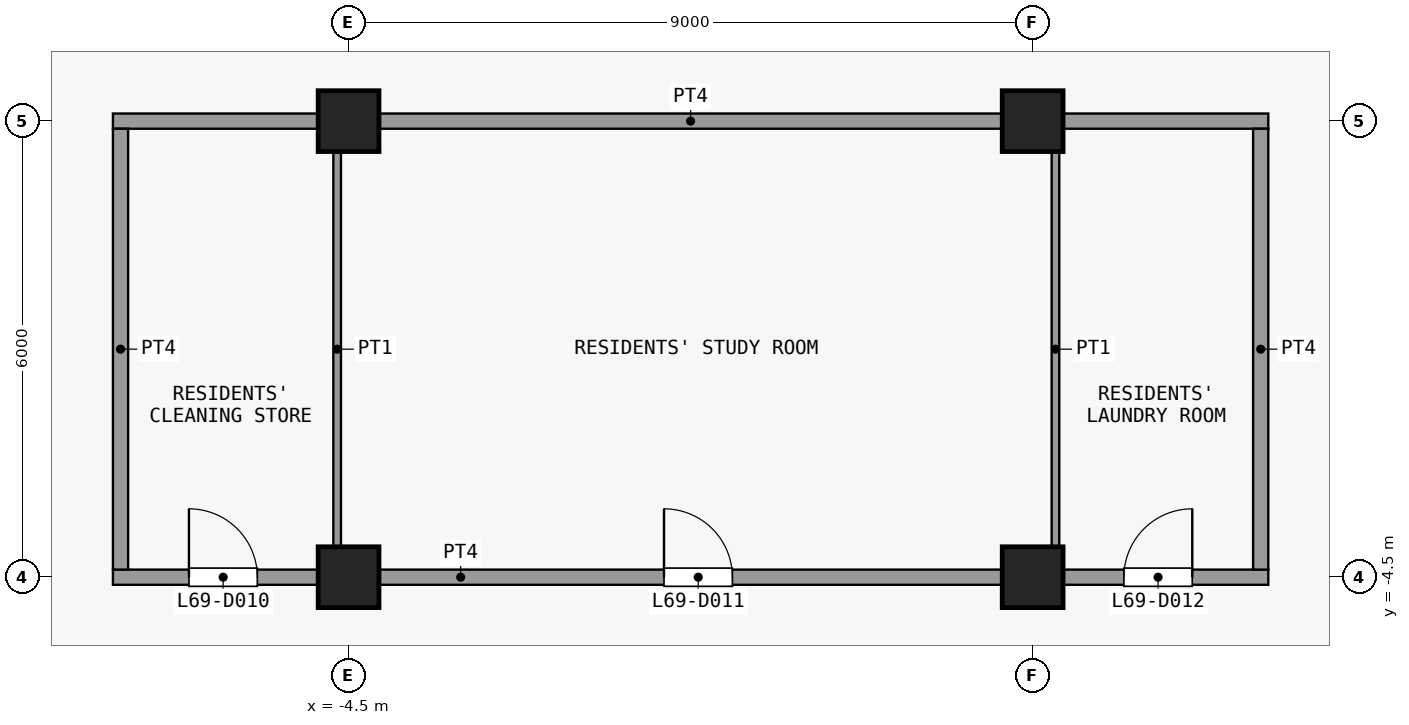
"""IFC4 building model, lengths in metres.
Left out: names, types, materials, properties, quantities, classifications, styles, units other than length and angle.
Written with IfcOpenShell. Run it as: python <this file> out.ifc"""

import sys

from ifc_helpers import new_model, si_unit, direction, frame, frame_2d, origin, origin_2d, place, context, subcontext, project, spatial, rectangle, extrude, element, fill, save


model = new_model("IFC4")
c1 = context("Model", 3, precision=1e-05, world=origin(), true_north=direction((0.0, 1.0)))
c2 = subcontext(c1, "Body", "Model", "MODEL_VIEW")
j1 = project(units=[si_unit("LENGTHUNIT", "METRE"), si_unit("PLANEANGLEUNIT", "RADIAN")], contexts=[c1])
p1 = place(None, origin())
s1 = spatial("IfcSite", under=j1, at=p1, CompositionType="ELEMENT")
p2 = place(p1, origin())
s2 = spatial("IfcBuilding", under=s1, at=p2, CompositionType="ELEMENT")
p3 = place(p2, frame((0.0, 0.0, 273.5)))
s3 = spatial("IfcBuildingStorey", under=s2, at=p3, CompositionType="ELEMENT", Elevation=273.5)
for number, where, z_axis, x_axis in (
    (1, (-4.5, -4.5, 0.0), (0.0, 0.0, 1.0), (1.0, 0.0, 0.0)),
    (2, (-4.5, 1.5, 0.0), (0.0, 0.0, 1.0), (1.0, 0.0, 0.0)),
    (3, (4.5, -4.5, 0.0), (0.0, 0.0, 1.0), (1.0, 0.0, 0.0)),
    (4, (4.5, 1.5, 0.0), (0.0, 0.0, 1.0), (1.0, 0.0, 0.0)),
):
    element("IfcColumn", number, at=place(p3, frame(where, z_axis=z_axis, x_axis=x_axis)), inside=s3, PredefinedType="COLUMN", context=c2, shape_type="SweptSolid", body=[
        extrude(rectangle(XDim=0.8, YDim=0.8, at=origin_2d()), origin(), (0.0, 0.0, 1.0), 3.6),
    ])
p4 = place(p3, frame((-7.6, -4.5, 0.0), z_axis=(0.0, 0.0, 1.0), x_axis=(1.0, 0.0, 0.0)))
e5 = element("IfcWall", 5, at=p4, inside=s3, PredefinedType="PARTITIONING", context=c2, shape_type="SweptSolid", body=[
    extrude(rectangle(XDim=15.2, YDim=0.2, at=frame_2d((7.6, 0.0))), origin(), (0.0, 0.0, 1.0), 3.3),
])
p5 = place(p4, frame((1.0, 0.0, 0.0)))
e6 = element("IfcOpeningElement", 6, at=p5, cuts=e5, PredefinedType="OPENING", context=c2, shape_type="SweptSolid", body=[
    extrude(rectangle(XDim=0.9, YDim=2.1, at=frame_2d((0.45, 1.05))), frame((0.0, 0.11, 0.0), z_axis=(0.0, -1.0, 0.0), x_axis=(1.0, 0.0, 0.0)), (0.0, 0.0, 1.0), 0.22),
])
p6 = place(p4, frame((7.25, 0.0, 0.0)))
e7 = element("IfcOpeningElement", 7, at=p6, cuts=e5, PredefinedType="OPENING", context=c2, shape_type="SweptSolid", body=[
    extrude(rectangle(XDim=0.9, YDim=2.1, at=frame_2d((0.45, 1.05))), frame((0.0, 0.11, 0.0), z_axis=(0.0, -1.0, 0.0), x_axis=(1.0, 0.0, 0.0)), (0.0, 0.0, 1.0), 0.22),
])
p7 = place(p4, frame((13.3, 0.0, 0.0)))
e8 = element("IfcOpeningElement", 8, at=p7, cuts=e5, PredefinedType="OPENING", context=c2, shape_type="SweptSolid", body=[
    extrude(rectangle(XDim=0.9, YDim=2.1, at=frame_2d((0.45, 1.05))), frame((0.0, 0.11, 0.0), z_axis=(0.0, -1.0, 0.0), x_axis=(1.0, 0.0, 0.0)), (0.0, 0.0, 1.0), 0.22),
])
p8 = place(p3, frame((-7.6, 1.5, 0.0), z_axis=(0.0, 0.0, 1.0), x_axis=(1.0, 0.0, 0.0)))
e9 = element("IfcWall", 9, at=p8, inside=s3, PredefinedType="PARTITIONING", context=c2, shape_type="SweptSolid", body=[
    extrude(rectangle(XDim=15.2, YDim=0.2, at=frame_2d((7.6, 0.0))), origin(), (0.0, 0.0, 1.0), 3.3),
])
p9 = place(p3, frame((-7.5, -4.4, 0.0), z_axis=(0.0, 0.0, 1.0), x_axis=(0.0, 1.0, 0.0)))
e10 = element("IfcWall", 10, at=p9, inside=s3, PredefinedType="PARTITIONING", context=c2, shape_type="SweptSolid", body=[
    extrude(rectangle(XDim=5.8, YDim=0.2, at=frame_2d((2.9, 0.0))), origin(), (0.0, 0.0, 1.0), 3.3),
])
for number, where, z_axis, x_axis in (
    (11, (-4.65, -4.4, 0.0), (0.0, 0.0, 1.0), (0.0, 1.0, 0.0)),
    (12, (4.8, -4.4, 0.0), (0.0, 0.0, 1.0), (0.0, 1.0, 0.0)),
):
    element("IfcWall", number, at=place(p3, frame(where, z_axis=z_axis, x_axis=x_axis)), inside=s3, PredefinedType="PARTITIONING", context=c2, shape_type="SweptSolid", body=[
        extrude(rectangle(XDim=5.8, YDim=0.1, at=frame_2d((2.9, 0.0))), origin(), (0.0, 0.0, 1.0), 3.3),
    ])
p10 = place(p3, frame((7.5, -4.4, 0.0), z_axis=(0.0, 0.0, 1.0), x_axis=(0.0, 1.0, 0.0)))
e13 = element("IfcWall", 13, at=p10, inside=s3, PredefinedType="PARTITIONING", context=c2, shape_type="SweptSolid", body=[
    extrude(rectangle(XDim=5.8, YDim=0.2, at=frame_2d((2.9, 0.0))), origin(), (0.0, 0.0, 1.0), 3.3),
])
p11 = place(p5, origin())
e14 = element("IfcDoor", 14, at=p11, inside=s3, OperationType="SINGLE_SWING_RIGHT", PredefinedType="DOOR", context=c2, shape_type="SweptSolid", body=[
    extrude(rectangle(XDim=0.9, YDim=2.1, at=frame_2d((0.45, 1.05))), frame((0.0, 0.025, 0.0), z_axis=(0.0, -1.0, 0.0), x_axis=(1.0, 0.0, 0.0)), (0.0, 0.0, 1.0), 0.05),
])
fill(e6, e14)
p12 = place(p6, origin())
e15 = element("IfcDoor", 15, at=p12, inside=s3, OperationType="SINGLE_SWING_RIGHT", PredefinedType="DOOR", context=c2, shape_type="SweptSolid", body=[
    extrude(rectangle(XDim=0.9, YDim=2.1, at=frame_2d((0.45, 1.05))), frame((0.0, 0.025, 0.0), z_axis=(0.0, -1.0, 0.0), x_axis=(1.0, 0.0, 0.0)), (0.0, 0.0, 1.0), 0.05),
])
fill(e7, e15)
p13 = place(p7, origin())
e16 = element("IfcDoor", 16, at=p13, inside=s3, OperationType="SINGLE_SWING_LEFT", PredefinedType="DOOR", context=c2, shape_type="SweptSolid", body=[
    extrude(rectangle(XDim=0.9, YDim=2.1, at=frame_2d((0.45, 1.05))), frame((0.0, 0.025, 0.0), z_axis=(0.0, -1.0, 0.0), x_axis=(1.0, 0.0, 0.0)), (0.0, 0.0, 1.0), 0.05),
])
fill(e8, e16)
save(model, sys.argv[1])
